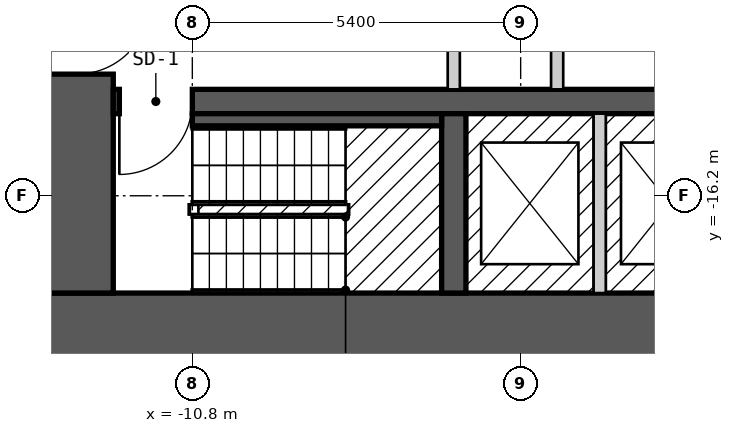
"""IFC4 building model, lengths in metres.
Left out: names, types, materials, properties, quantities, classifications, styles, units other than length and angle.
Written with IfcOpenShell. Run it as: python <this file> out.ifc"""

import sys

from ifc_helpers import new_model, si_unit, direction, frame, frame_2d, origin, place, context, subcontext, project, spatial, rectangle, extrude, element, fill, save


model = new_model("IFC4")
c1 = context("Model", 3, precision=1e-05, world=origin(), true_north=direction((0.0, 1.0)))
c2 = subcontext(c1, "Body", "Model", "MODEL_VIEW")
j1 = project(units=[si_unit("LENGTHUNIT", "METRE"), si_unit("PLANEANGLEUNIT", "RADIAN")], contexts=[c1])
p1 = place(None, origin())
s1 = spatial("IfcSite", under=j1, at=p1, CompositionType="ELEMENT")
p2 = place(p1, origin())
s2 = spatial("IfcBuilding", under=s1, at=p2, CompositionType="ELEMENT")
p3 = place(p2, frame((0.0, 0.0, 16.2)))
s3 = spatial("IfcBuildingStorey", under=s2, at=p3, CompositionType="ELEMENT", Elevation=16.2)
p4 = place(p3, frame((-13.3, -18.4, 0.0), z_axis=(0.0, 0.0, 1.0), x_axis=(1.0, 0.0, 0.0)))
e1 = element("IfcWall", 1, at=p4, inside=s3, PredefinedType="SHEAR", context=c2, shape_type="SweptSolid", body=[
    extrude(rectangle(XDim=26.6, YDim=1.2, at=frame_2d((13.3, 0.0))), origin(), (0.0, 0.0, 1.0), 3.25),
])
p5 = place(p3, frame((-12.7, -17.8, 0.0), z_axis=(0.0, 0.0, 1.0), x_axis=(0.0, 1.0, 0.0)))
e2 = element("IfcWall", 2, at=p5, inside=s3, PredefinedType="SHEAR", context=c2, shape_type="SweptSolid", body=[
    extrude(rectangle(XDim=11.6, YDim=1.2, at=frame_2d((5.8, 0.0))), origin(), (0.0, 0.0, 1.0), 3.25),
])
p6 = place(p5, frame((3.6, 0.0, 0.0)))
e3 = element("IfcOpeningElement", 3, at=p6, cuts=e2, PredefinedType="OPENING", context=c2, shape_type="SweptSolid", body=[
    extrude(rectangle(XDim=1.2, YDim=2.1, at=frame_2d((0.6, 1.05))), frame((0.0, 0.61, 0.0), z_axis=(0.0, -1.0, 0.0), x_axis=(1.0, 0.0, 0.0)), (0.0, 0.0, 1.0), 1.22),
])
p7 = place(p3, frame((-12.1, -14.65, 0.0), z_axis=(0.0, 0.0, 1.0), x_axis=(1.0, 0.0, 0.0)))
e4 = element("IfcWall", 4, at=p7, inside=s3, PredefinedType="SHEAR", context=c2, shape_type="SweptSolid", body=[
    extrude(rectangle(XDim=24.2, YDim=0.4, at=frame_2d((12.1, 0.0))), origin(), (0.0, 0.0, 1.0), 3.25),
])
p8 = place(p7, frame((1.3, 0.0, 0.0), z_axis=(0.0, 0.0, 1.0), x_axis=(-1.0, 0.0, 0.0)))
e5 = element("IfcOpeningElement", 5, at=p8, cuts=e4, PredefinedType="OPENING", context=c2, shape_type="SweptSolid", body=[
    extrude(rectangle(XDim=1.2, YDim=2.1, at=frame_2d((0.6, 1.05))), frame((0.0, 0.21, 0.0), z_axis=(0.0, -1.0, 0.0), x_axis=(1.0, 0.0, 0.0)), (0.0, 0.0, 1.0), 0.42),
])
p9 = place(p7, frame((24.15, 0.0, 0.0), z_axis=(0.0, 0.0, 1.0), x_axis=(-1.0, 0.0, 0.0)))
e6 = element("IfcOpeningElement", 6, at=p9, cuts=e4, PredefinedType="OPENING", context=c2, shape_type="SweptSolid", body=[
    extrude(rectangle(XDim=1.2, YDim=2.1, at=frame_2d((0.6, 1.05))), frame((0.0, 0.21, 0.0), z_axis=(0.0, -1.0, 0.0), x_axis=(1.0, 0.0, 0.0)), (0.0, 0.0, 1.0), 0.42),
])
p10 = place(p7, frame((17.2, 0.0, 0.0), z_axis=(0.0, 0.0, 1.0), x_axis=(-1.0, 0.0, 0.0)))
e7 = element("IfcOpeningElement", 7, at=p10, cuts=e4, PredefinedType="OPENING", context=c2, shape_type="SweptSolid", body=[
    extrude(rectangle(XDim=1.0, YDim=2.1, at=frame_2d((0.5, 1.05))), frame((0.0, 0.21, 0.0), z_axis=(0.0, -1.0, 0.0), x_axis=(1.0, 0.0, 0.0)), (0.0, 0.0, 1.0), 0.42),
])
p11 = place(p3, frame((-6.5, -17.8, 0.0), z_axis=(0.0, 0.0, 1.0), x_axis=(0.0, 1.0, 0.0)))
e8 = element("IfcWall", 8, at=p11, inside=s3, PredefinedType="SHEAR", context=c2, shape_type="SweptSolid", body=[
    extrude(rectangle(XDim=2.95, YDim=0.4, at=frame_2d((1.475, 0.0))), origin(), (0.0, 0.0, 1.0), 3.25),
])
p12 = place(p3, frame((-10.8, -14.95, 0.0), z_axis=(0.0, 0.0, 1.0), x_axis=(1.0, 0.0, 0.0)))
e9 = element("IfcWall", 9, at=p12, inside=s3, PredefinedType="SOLIDWALL", context=c2, shape_type="SweptSolid", body=[
    extrude(rectangle(XDim=4.1, YDim=0.2, at=frame_2d((2.05, 0.0))), origin(), (0.0, 0.0, 1.0), 3.25),
])
p13 = place(p3, frame((-6.5, -14.45, 0.0), z_axis=(0.0, 0.0, 1.0), x_axis=(0.0, 1.0, 0.0)))
e10 = element("IfcWall", 10, at=p13, inside=s3, PredefinedType="PARTITIONING", context=c2, shape_type="SweptSolid", body=[
    extrude(rectangle(XDim=4.9, YDim=0.2, at=frame_2d((2.45, 0.0))), origin(), (0.0, 0.0, 1.0), 3.25),
])
p14 = place(p13, frame((3.15, 0.0, 0.0), z_axis=(0.0, 0.0, 1.0), x_axis=(-1.0, 0.0, 0.0)))
e11 = element("IfcOpeningElement", 11, at=p14, cuts=e10, PredefinedType="OPENING", context=c2, shape_type="SweptSolid", body=[
    extrude(rectangle(XDim=1.4, YDim=2.1, at=frame_2d((0.7, 1.05))), frame((0.0, 0.11, 0.0), z_axis=(0.0, -1.0, 0.0), x_axis=(1.0, 0.0, 0.0)), (0.0, 0.0, 1.0), 0.22),
])
p15 = place(p3, frame((-4.8, -14.45, 0.0), z_axis=(0.0, 0.0, 1.0), x_axis=(0.0, 1.0, 0.0)))
e12 = element("IfcWall", 12, at=p15, inside=s3, PredefinedType="PARTITIONING", context=c2, shape_type="SweptSolid", body=[
    extrude(rectangle(XDim=2.0, YDim=0.2, at=frame_2d((1.0, 0.0))), origin(), (0.0, 0.0, 1.0), 3.25),
])
p16 = place(p3, frame((-4.1, -17.8, 0.0), z_axis=(0.0, 0.0, 1.0), x_axis=(0.0, 1.0, 0.0)))
e13 = element("IfcWall", 13, at=p16, inside=s3, PredefinedType="SOLIDWALL", context=c2, shape_type="SweptSolid", body=[
    extrude(rectangle(XDim=2.95, YDim=0.2, at=frame_2d((1.475, 0.0))), origin(), (0.0, 0.0, 1.0), 3.25),
])
p17 = place(p8, origin())
e14 = element("IfcDoor", 14, at=p17, inside=s3, OperationType="SINGLE_SWING_RIGHT", PredefinedType="DOOR", context=c2, shape_type="SweptSolid", body=[
    extrude(rectangle(XDim=1.2, YDim=2.1, at=frame_2d((0.6, 1.05))), frame((0.0, 0.025, 0.0), z_axis=(0.0, -1.0, 0.0), x_axis=(1.0, 0.0, 0.0)), (0.0, 0.0, 1.0), 0.05),
])
fill(e5, e14)
p18 = place(p6, origin())
e15 = element("IfcDoor", 15, at=p18, inside=s3, OperationType="SINGLE_SWING_RIGHT", PredefinedType="DOOR", context=c2, shape_type="SweptSolid", body=[
    extrude(rectangle(XDim=1.2, YDim=2.1, at=frame_2d((0.6, 1.05))), frame((0.0, 0.025, 0.0), z_axis=(0.0, -1.0, 0.0), x_axis=(1.0, 0.0, 0.0)), (0.0, 0.0, 1.0), 0.05),
])
fill(e3, e15)
save(model, sys.argv[1])
